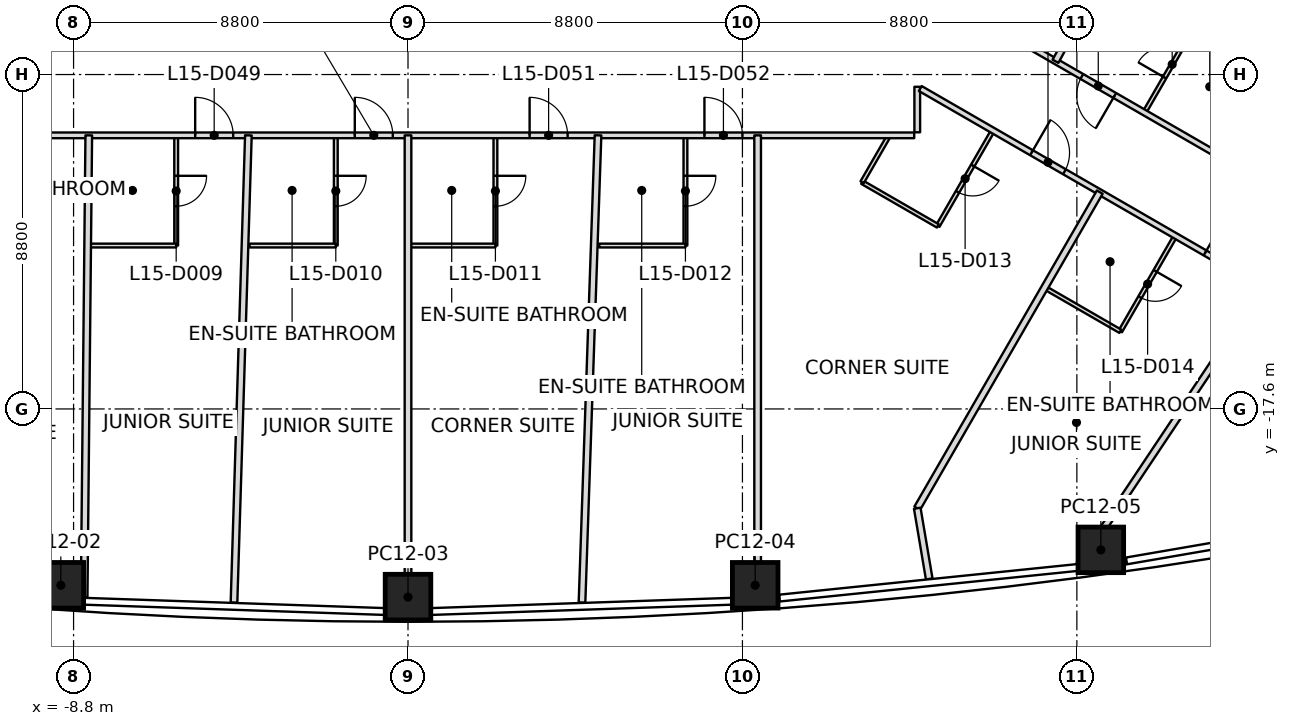
"""IFC4 building model, lengths in metres.
Left out: names, types, materials, properties, quantities, classifications, styles, units other than length and angle.
Written with IfcOpenShell. Run it as: python <this file> out.ifc"""

import sys

from ifc_helpers import new_model, si_unit, direction, frame, frame_2d, origin, origin_2d, place, context, subcontext, project, spatial, rectangle, extrude, clip, halfspace, element, fill, save


model = new_model("IFC4")
c1 = context("Model", 3, precision=1e-05, world=origin(), true_north=direction((0.0, 1.0)))
c2 = subcontext(c1, "Body", "Model", "MODEL_VIEW")
j1 = project(units=[si_unit("LENGTHUNIT", "METRE"), si_unit("PLANEANGLEUNIT", "RADIAN")], contexts=[c1])
p1 = place(None, origin())
s1 = spatial("IfcSite", under=j1, at=p1, CompositionType="ELEMENT")
p2 = place(p1, origin())
s2 = spatial("IfcBuilding", under=s1, at=p2, CompositionType="ELEMENT")
p3 = place(p2, frame((0.0, 0.0, 77.6)))
s3 = spatial("IfcBuildingStorey", under=s2, at=p3, CompositionType="ELEMENT", Elevation=77.6)
p4 = place(p3, frame((-9.135, -22.24, 0.0), z_axis=(0.009625518264, 0.040282134652, 0.999141981415), x_axis=(-0.997637584902, 0.068353896392, 0.006855219842)))
e1 = element("IfcColumn", 1, at=p4, inside=s3, PredefinedType="COLUMN", context=c2, shape_type="SweptSolid", body=[
    clip(clip(extrude(rectangle(XDim=1.2, YDim=1.2, at=origin_2d()), origin(), (0.0, 0.0, 1.0), 3.703), halfspace(frame((0.0, 0.0, 0.018)), True)), halfspace(frame((0.0, 0.0, 3.694)), False)),
])
p5 = place(p3, frame((0.0, -22.551, 0.0), z_axis=(0.0, 0.0427849366, 0.999084305352), x_axis=(1.0, 0.0, 0.0)))
e2 = element("IfcColumn", 2, at=p5, inside=s3, PredefinedType="COLUMN", context=c2, shape_type="SweptSolid", body=[
    clip(clip(extrude(rectangle(XDim=1.2, YDim=1.2, at=origin_2d()), origin(), (0.0, 0.0, 1.0), 3.703), halfspace(frame((0.0, 0.0, 0.019)), True)), halfspace(frame((0.0, 0.0, 3.694)), False)),
])
p6 = place(p3, frame((9.135, -22.24, 0.0), z_axis=(-0.009625518264, 0.040282134652, 0.999141981415), x_axis=(0.997637584902, 0.068353896392, 0.006855219842)))
e3 = element("IfcColumn", 3, at=p6, inside=s3, PredefinedType="COLUMN", context=c2, shape_type="SweptSolid", body=[
    clip(clip(extrude(rectangle(XDim=1.2, YDim=1.2, at=origin_2d()), origin(), (0.0, 0.0, 1.0), 3.703), halfspace(frame((0.0, 0.0, 0.018)), True)), halfspace(frame((0.0, 0.0, 3.694)), False)),
])
p7 = place(p3, frame((18.231, -21.308, 0.0), z_axis=(-0.019253687779, 0.03270489431, 0.999279583197), x_axis=(0.990559922783, 0.136298030063, 0.014624854803)))
e4 = element("IfcColumn", 4, at=p7, inside=s3, PredefinedType="COLUMN", context=c2, shape_type="SweptSolid", body=[
    clip(clip(extrude(rectangle(XDim=1.2, YDim=1.2, at=origin_2d()), origin(), (0.0, 0.0, 1.0), 3.703), halfspace(frame((0.0, 0.0, 0.015)), True)), halfspace(frame((0.0, 0.0, 3.695)), False)),
])
p8 = place(p3, frame((-8.4, -10.4, 0.0), z_axis=(0.0, 0.0, 1.0), x_axis=(-0.010057712495, -0.999949419931, 0.0)))
e5 = element("IfcWall", 5, at=p8, inside=s3, PredefinedType="PARTITIONING", context=c2, shape_type="SweptSolid", body=[
    extrude(rectangle(XDim=12.161, YDim=0.175, at=frame_2d((6.081, 0.0))), origin(), (0.0, 0.0, 1.0), 2.934),
])
p9 = place(p3, frame((-4.2, -10.4, 0.0), z_axis=(0.0, 0.0, 1.0), x_axis=(-0.030783045714, -0.999526089753, 0.0)))
e6 = element("IfcWall", 6, at=p9, inside=s3, PredefinedType="PARTITIONING", context=c2, shape_type="SweptSolid", body=[
    extrude(rectangle(XDim=12.301, YDim=0.175, at=frame_2d((6.15, 0.0))), origin(), (0.0, 0.0, 1.0), 2.934),
])
p10 = place(p3, frame((0.0, -10.4, 0.0), z_axis=(0.0, 0.0, 1.0), x_axis=(0.0, -1.0, 0.0)))
e7 = element("IfcWall", 7, at=p10, inside=s3, PredefinedType="PARTITIONING", context=c2, shape_type="SweptSolid", body=[
    extrude(rectangle(XDim=12.681, YDim=0.175, at=frame_2d((6.341, 0.0))), origin(), (0.0, 0.0, 1.0), 3.15),
])
p11 = place(p3, frame((5.0, -10.4, 0.0), z_axis=(0.0, 0.0, 1.0), x_axis=(-0.034252441484, -0.999413212967, 0.0)))
e8 = element("IfcWall", 8, at=p11, inside=s3, PredefinedType="PARTITIONING", context=c2, shape_type="SweptSolid", body=[
    extrude(rectangle(XDim=12.302, YDim=0.175, at=frame_2d((6.151, 0.0))), origin(), (0.0, 0.0, 1.0), 2.934),
])
p12 = place(p3, frame((9.2, -10.4, 0.0), z_axis=(0.0, 0.0, 1.0), x_axis=(0.0, -1.0, 0.0)))
e9 = element("IfcWall", 9, at=p12, inside=s3, PredefinedType="PARTITIONING", context=c2, shape_type="SweptSolid", body=[
    extrude(rectangle(XDim=12.364, YDim=0.175, at=frame_2d((6.182, 0.0))), origin(), (0.0, 0.0, 1.0), 3.15),
])
p13 = place(p3, frame((18.202, -11.895, 0.0), z_axis=(0.0, 0.0, 1.0), x_axis=(-0.500004836318, -0.866022611517, 0.0)))
e10 = element("IfcWall", 10, at=p13, inside=s3, PredefinedType="PARTITIONING", context=c2, shape_type="SweptSolid", body=[
    extrude(rectangle(XDim=9.604, YDim=0.175, at=frame_2d((4.802, 0.0))), origin(), (0.0, 0.0, 1.0), 3.093),
])
p14 = place(p3, frame((13.4, -20.212, 0.0), z_axis=(0.0, 0.0, 1.0), x_axis=(0.166811851032, -0.985988745552, 0.0)))
e11 = element("IfcWall", 11, at=p14, inside=s3, PredefinedType="PARTITIONING", context=c2, shape_type="SweptSolid", body=[
    extrude(rectangle(XDim=1.886, YDim=0.175, at=frame_2d((0.943, 0.0))), origin(), (0.0, 0.0, 1.0), 2.934),
])
p15 = place(p3, frame((23.741, 3.817, 0.0), z_axis=(0.0, 0.0, 1.0), x_axis=(-0.479523714328, -0.877528921117, 0.0)))
e12 = element("IfcWall", 12, at=p15, inside=s3, PredefinedType="PARTITIONING", context=c2, shape_type="SweptSolid", body=[
    extrude(rectangle(XDim=13.98, YDim=0.175, at=frame_2d((6.99, 0.0))), origin(), (0.0, 0.0, 1.0), 2.947),
])
p16 = place(p3, frame((22.532, -14.395, 0.0), z_axis=(0.0, 0.0, 1.0), x_axis=(-0.554931610564, -0.83189597162, 0.0)))
e13 = element("IfcWall", 13, at=p16, inside=s3, PredefinedType="PARTITIONING", context=c2, shape_type="SweptSolid", body=[
    extrude(rectangle(XDim=8.764, YDim=0.175, at=frame_2d((4.382, 0.0))), origin(), (0.0, 0.0, 1.0), 3.15),
])
p17 = place(p3, frame((-13.32, -10.4, 0.0), z_axis=(0.0, 0.0, 1.0), x_axis=(1.0, 0.0, 0.0)))
e14 = element("IfcWall", 14, at=p17, inside=s3, PredefinedType="PARTITIONING", context=c2, shape_type="SweptSolid", body=[
    extrude(rectangle(XDim=26.64, YDim=0.15, at=frame_2d((13.32, 0.0))), origin(), (0.0, 0.0, 1.0), 2.947),
])
p18 = place(p17, frame((7.72, 0.0, 0.0)))
e15 = element("IfcOpeningElement", 15, at=p18, cuts=e14, PredefinedType="OPENING", context=c2, shape_type="SweptSolid", body=[
    extrude(rectangle(XDim=1.0, YDim=2.1, at=frame_2d((0.5, 1.05))), frame((0.0, 0.075, 0.0), z_axis=(0.0, -1.0, 0.0), x_axis=(1.0, 0.0, 0.0)), (0.0, 0.0, 1.0), 0.15),
])
p19 = place(p17, frame((11.92, 0.0, 0.0)))
e16 = element("IfcOpeningElement", 16, at=p19, cuts=e14, PredefinedType="OPENING", context=c2, shape_type="SweptSolid", body=[
    extrude(rectangle(XDim=1.0, YDim=2.1, at=frame_2d((0.5, 1.05))), frame((0.0, 0.075, 0.0), z_axis=(0.0, -1.0, 0.0), x_axis=(1.0, 0.0, 0.0)), (0.0, 0.0, 1.0), 0.15),
])
p20 = place(p17, frame((16.52, 0.0, 0.0)))
e17 = element("IfcOpeningElement", 17, at=p20, cuts=e14, PredefinedType="OPENING", context=c2, shape_type="SweptSolid", body=[
    extrude(rectangle(XDim=1.0, YDim=2.1, at=frame_2d((0.5, 1.05))), frame((0.0, 0.075, 0.0), z_axis=(0.0, -1.0, 0.0), x_axis=(1.0, 0.0, 0.0)), (0.0, 0.0, 1.0), 0.15),
])
p21 = place(p17, frame((21.12, 0.0, 0.0)))
e18 = element("IfcOpeningElement", 18, at=p21, cuts=e14, PredefinedType="OPENING", context=c2, shape_type="SweptSolid", body=[
    extrude(rectangle(XDim=1.0, YDim=2.1, at=frame_2d((0.5, 1.05))), frame((0.0, 0.075, 0.0), z_axis=(0.0, -1.0, 0.0), x_axis=(1.0, 0.0, 0.0)), (0.0, 0.0, 1.0), 0.15),
])
p22 = place(p3, frame((13.4, -10.32, 0.0), z_axis=(0.0, 0.0, 1.0), x_axis=(0.0, 1.0, 0.0)))
e19 = element("IfcWall", 19, at=p22, inside=s3, PredefinedType="PARTITIONING", context=c2, shape_type="SweptSolid", body=[
    extrude(rectangle(XDim=1.198, YDim=0.15, at=frame_2d((0.599, 0.0))), origin(), (0.0, 0.0, 1.0), 2.797),
])
p23 = place(p3, frame((13.479, -9.168, 0.0), z_axis=(0.0, 0.0, 1.0), x_axis=(0.866028819782, -0.499994083273, 0.0)))
e20 = element("IfcWall", 20, at=p23, inside=s3, PredefinedType="PARTITIONING", context=c2, shape_type="SweptSolid", body=[
    extrude(rectangle(XDim=10.374, YDim=0.15, at=frame_2d((5.187, 0.0))), origin(), (0.0, 0.0, 1.0), 2.797),
])
p24 = place(p23, frame((3.381, 0.0, 0.0)))
e21 = element("IfcOpeningElement", 21, at=p24, cuts=e20, PredefinedType="OPENING", context=c2, shape_type="SweptSolid", body=[
    extrude(rectangle(XDim=1.0, YDim=2.1, at=frame_2d((0.5, 1.05))), frame((0.0, 0.075, 0.0), z_axis=(0.0, -1.0, 0.0), x_axis=(1.0, 0.0, 0.0)), (0.0, 0.0, 1.0), 0.15),
])
p25 = place(p23, frame((8.654, 0.0, 0.0)))
e22 = element("IfcOpeningElement", 22, at=p25, cuts=e20, PredefinedType="OPENING", context=c2, shape_type="SweptSolid", body=[
    extrude(rectangle(XDim=1.0, YDim=2.1, at=frame_2d((0.5, 1.05))), frame((0.0, 0.075, 0.0), z_axis=(0.0, -1.0, 0.0), x_axis=(1.0, 0.0, 0.0)), (0.0, 0.0, 1.0), 0.15),
])
p26 = place(p3, frame((23.663, -12.276, 0.0), z_axis=(0.0, 0.0, 1.0), x_axis=(-0.866031207587, 0.499989947384, 0.0)))
e23 = element("IfcWall", 23, at=p26, inside=s3, PredefinedType="PARTITIONING", context=c2, shape_type="SweptSolid", body=[
    extrude(rectangle(XDim=11.851, YDim=0.15, at=frame_2d((5.925, 0.0))), origin(), (0.0, 0.0, 1.0), 2.947),
])
p27 = place(p26, frame((0.785, 0.0, 0.0)))
e24 = element("IfcOpeningElement", 24, at=p27, cuts=e23, PredefinedType="OPENING", context=c2, shape_type="SweptSolid", body=[
    extrude(rectangle(XDim=1.0, YDim=2.1, at=frame_2d((0.5, 1.05))), frame((0.0, 0.075, 0.0), z_axis=(0.0, -1.0, 0.0), x_axis=(1.0, 0.0, 0.0)), (0.0, 0.0, 1.0), 0.15),
])
p28 = place(p26, frame((5.851, 0.0, 0.0)))
e25 = element("IfcOpeningElement", 25, at=p28, cuts=e23, PredefinedType="OPENING", context=c2, shape_type="SweptSolid", body=[
    extrude(rectangle(XDim=1.0, YDim=2.1, at=frame_2d((0.5, 1.05))), frame((0.0, 0.075, 0.0), z_axis=(0.0, -1.0, 0.0), x_axis=(1.0, 0.0, 0.0)), (0.0, 0.0, 1.0), 0.15),
])
p29 = place(p3, frame((-6.1, -10.43, 0.0), z_axis=(0.0, 0.0, 1.0), x_axis=(0.0, -1.0, 0.0)))
e26 = element("IfcWall", 26, at=p29, inside=s3, PredefinedType="PARTITIONING", context=c2, shape_type="SweptSolid", body=[
    extrude(rectangle(XDim=2.87, YDim=0.1, at=frame_2d((1.435, 0.0))), origin(), (0.0, 0.0, 1.0), 3.15),
])
p30 = place(p29, frame((1.035, 0.0, 0.0)))
e27 = element("IfcOpeningElement", 27, at=p30, cuts=e26, PredefinedType="OPENING", context=c2, shape_type="SweptSolid", body=[
    extrude(rectangle(XDim=0.8, YDim=2.1, at=frame_2d((0.4, 1.05))), frame((0.0, 0.05, 0.0), z_axis=(0.0, -1.0, 0.0), x_axis=(1.0, 0.0, 0.0)), (0.0, 0.0, 1.0), 0.1),
])
p31 = place(p3, frame((-6.1, -13.3, 0.0), z_axis=(0.0, 0.0, 1.0), x_axis=(-1.0, 0.0, 0.0)))
e28 = element("IfcWall", 28, at=p31, inside=s3, PredefinedType="PARTITIONING", context=c2, shape_type="SweptSolid", body=[
    extrude(rectangle(XDim=2.27, YDim=0.1, at=frame_2d((1.135, 0.0))), origin(), (0.0, 0.0, 1.0), 3.15),
])
p32 = place(p3, frame((-1.9, -10.43, 0.0), z_axis=(0.0, 0.0, 1.0), x_axis=(0.0, -1.0, 0.0)))
e29 = element("IfcWall", 29, at=p32, inside=s3, PredefinedType="PARTITIONING", context=c2, shape_type="SweptSolid", body=[
    extrude(rectangle(XDim=2.87, YDim=0.1, at=frame_2d((1.435, 0.0))), origin(), (0.0, 0.0, 1.0), 3.15),
])
p33 = place(p32, frame((1.035, 0.0, 0.0)))
e30 = element("IfcOpeningElement", 30, at=p33, cuts=e29, PredefinedType="OPENING", context=c2, shape_type="SweptSolid", body=[
    extrude(rectangle(XDim=0.8, YDim=2.1, at=frame_2d((0.4, 1.05))), frame((0.0, 0.05, 0.0), z_axis=(0.0, -1.0, 0.0), x_axis=(1.0, 0.0, 0.0)), (0.0, 0.0, 1.0), 0.1),
])
p34 = place(p3, frame((-1.9, -13.3, 0.0), z_axis=(0.0, 0.0, 1.0), x_axis=(-1.0, 0.0, 0.0)))
e31 = element("IfcWall", 31, at=p34, inside=s3, PredefinedType="PARTITIONING", context=c2, shape_type="SweptSolid", body=[
    extrude(rectangle(XDim=2.27, YDim=0.1, at=frame_2d((1.135, 0.0))), origin(), (0.0, 0.0, 1.0), 3.15),
])
p35 = place(p3, frame((2.3, -10.43, 0.0), z_axis=(0.0, 0.0, 1.0), x_axis=(0.0, -1.0, 0.0)))
e32 = element("IfcWall", 32, at=p35, inside=s3, PredefinedType="PARTITIONING", context=c2, shape_type="SweptSolid", body=[
    extrude(rectangle(XDim=2.87, YDim=0.1, at=frame_2d((1.435, 0.0))), origin(), (0.0, 0.0, 1.0), 3.15),
])
p36 = place(p35, frame((1.035, 0.0, 0.0)))
e33 = element("IfcOpeningElement", 33, at=p36, cuts=e32, PredefinedType="OPENING", context=c2, shape_type="SweptSolid", body=[
    extrude(rectangle(XDim=0.8, YDim=2.1, at=frame_2d((0.4, 1.05))), frame((0.0, 0.05, 0.0), z_axis=(0.0, -1.0, 0.0), x_axis=(1.0, 0.0, 0.0)), (0.0, 0.0, 1.0), 0.1),
])
p37 = place(p3, frame((2.3, -13.3, 0.0), z_axis=(0.0, 0.0, 1.0), x_axis=(-1.0, 0.0, 0.0)))
e34 = element("IfcWall", 34, at=p37, inside=s3, PredefinedType="PARTITIONING", context=c2, shape_type="SweptSolid", body=[
    extrude(rectangle(XDim=2.27, YDim=0.1, at=frame_2d((1.135, 0.0))), origin(), (0.0, 0.0, 1.0), 2.947),
])
p38 = place(p3, frame((7.3, -10.43, 0.0), z_axis=(0.0, 0.0, 1.0), x_axis=(0.0, -1.0, 0.0)))
e35 = element("IfcWall", 35, at=p38, inside=s3, PredefinedType="PARTITIONING", context=c2, shape_type="SweptSolid", body=[
    extrude(rectangle(XDim=2.87, YDim=0.1, at=frame_2d((1.435, 0.0))), origin(), (0.0, 0.0, 1.0), 3.15),
])
p39 = place(p38, frame((1.035, 0.0, 0.0)))
e36 = element("IfcOpeningElement", 36, at=p39, cuts=e35, PredefinedType="OPENING", context=c2, shape_type="SweptSolid", body=[
    extrude(rectangle(XDim=0.8, YDim=2.1, at=frame_2d((0.4, 1.05))), frame((0.0, 0.05, 0.0), z_axis=(0.0, -1.0, 0.0), x_axis=(1.0, 0.0, 0.0)), (0.0, 0.0, 1.0), 0.1),
])
p40 = place(p3, frame((7.3, -13.3, 0.0), z_axis=(0.0, 0.0, 1.0), x_axis=(-1.0, 0.0, 0.0)))
e37 = element("IfcWall", 37, at=p40, inside=s3, PredefinedType="PARTITIONING", context=c2, shape_type="SweptSolid", body=[
    extrude(rectangle(XDim=2.27, YDim=0.1, at=frame_2d((1.135, 0.0))), origin(), (0.0, 0.0, 1.0), 3.15),
])
p41 = place(p3, frame((15.377, -10.298, 0.0), z_axis=(0.0, 0.0, 1.0), x_axis=(-0.499999802827, -0.866025517622, 0.0)))
e38 = element("IfcWall", 38, at=p41, inside=s3, PredefinedType="PARTITIONING", context=c2, shape_type="SweptSolid", body=[
    extrude(rectangle(XDim=2.87, YDim=0.1, at=frame_2d((1.435, 0.0))), origin(), (0.0, 0.0, 1.0), 2.797),
])
p42 = place(p41, frame((1.035, 0.0, 0.0)))
e39 = element("IfcOpeningElement", 39, at=p42, cuts=e38, PredefinedType="OPENING", context=c2, shape_type="SweptSolid", body=[
    extrude(rectangle(XDim=0.8, YDim=2.1, at=frame_2d((0.4, 1.05))), frame((0.0, 0.05, 0.0), z_axis=(0.0, -1.0, 0.0), x_axis=(1.0, 0.0, 0.0)), (0.0, 0.0, 1.0), 0.1),
])
p43 = place(p3, frame((13.942, -12.784, 0.0), z_axis=(0.0, 0.0, 1.0), x_axis=(-0.866007057882, 0.500031774688, 0.0)))
e40 = element("IfcWall", 40, at=p43, inside=s3, PredefinedType="PARTITIONING", context=c2, shape_type="SweptSolid", body=[
    extrude(rectangle(XDim=2.3, YDim=0.1, at=frame_2d((1.15, 0.0))), origin(), (0.0, 0.0, 1.0), 3.15),
])
p44 = place(p3, frame((11.95, -11.634, 0.0), z_axis=(0.0, 0.0, 1.0), x_axis=(0.500087364259, 0.86597495813, 0.0)))
e41 = element("IfcWall", 41, at=p44, inside=s3, PredefinedType="PARTITIONING", context=c2, shape_type="SweptSolid", body=[
    extrude(rectangle(XDim=1.39, YDim=0.1, at=frame_2d((0.695, 0.0))), origin(), (0.0, 0.0, 1.0), 3.15),
])
p45 = place(p3, frame((20.179, -13.071, 0.0), z_axis=(0.0, 0.0, 1.0), x_axis=(-0.500036638401, -0.866004249561, 0.0)))
e42 = element("IfcWall", 42, at=p45, inside=s3, PredefinedType="PARTITIONING", context=c2, shape_type="SweptSolid", body=[
    extrude(rectangle(XDim=2.87, YDim=0.1, at=frame_2d((1.435, 0.0))), origin(), (0.0, 0.0, 1.0), 3.15),
])
p46 = place(p45, frame((1.035, 0.0, 0.0)))
e43 = element("IfcOpeningElement", 43, at=p46, cuts=e42, PredefinedType="OPENING", context=c2, shape_type="SweptSolid", body=[
    extrude(rectangle(XDim=0.8, YDim=2.1, at=frame_2d((0.4, 1.05))), frame((0.0, 0.05, 0.0), z_axis=(0.0, -1.0, 0.0), x_axis=(1.0, 0.0, 0.0)), (0.0, 0.0, 1.0), 0.1),
])
p47 = place(p3, frame((18.744, -15.556, 0.0), z_axis=(0.0, 0.0, 1.0), x_axis=(-0.866017224141, 0.500014167291, 0.0)))
e44 = element("IfcWall", 44, at=p47, inside=s3, PredefinedType="PARTITIONING", context=c2, shape_type="SweptSolid", body=[
    extrude(rectangle(XDim=2.27, YDim=0.1, at=frame_2d((1.135, 0.0))), origin(), (0.0, 0.0, 1.0), 3.15),
])
p48 = place(p3, frame((19.391, -9.775, 0.0), z_axis=(0.0, 0.0, 1.0), x_axis=(0.499999802827, 0.866025517622, 0.0)))
e45 = element("IfcWall", 45, at=p48, inside=s3, PredefinedType="PARTITIONING", context=c2, shape_type="SweptSolid", body=[
    extrude(rectangle(XDim=2.87, YDim=0.1, at=frame_2d((1.435, 0.0))), origin(), (0.0, 0.0, 1.0), 3.15),
])
p49 = place(p48, frame((1.035, 0.0, 0.0)))
e46 = element("IfcOpeningElement", 46, at=p49, cuts=e45, PredefinedType="OPENING", context=c2, shape_type="SweptSolid", body=[
    extrude(rectangle(XDim=0.8, YDim=2.1, at=frame_2d((0.4, 1.05))), frame((0.0, 0.05, 0.0), z_axis=(0.0, -1.0, 0.0), x_axis=(1.0, 0.0, 0.0)), (0.0, 0.0, 1.0), 0.1),
])
p50 = place(p3, frame((20.826, -7.289, 0.0), z_axis=(0.0, 0.0, 1.0), x_axis=(0.866017224141, -0.500014167291, 0.0)))
e47 = element("IfcWall", 47, at=p50, inside=s3, PredefinedType="PARTITIONING", context=c2, shape_type="SweptSolid", body=[
    extrude(rectangle(XDim=2.27, YDim=0.1, at=frame_2d((1.135, 0.0))), origin(), (0.0, 0.0, 1.0), 3.15),
])
p51 = place(p18, origin())
e48 = element("IfcDoor", 48, at=p51, inside=s3, OperationType="SINGLE_SWING_LEFT", PredefinedType="DOOR", context=c2, shape_type="SweptSolid", body=[
    extrude(rectangle(XDim=1.0, YDim=2.1, at=frame_2d((0.5, 1.05))), frame((0.0, 0.025, 0.0), z_axis=(0.0, -1.0, 0.0), x_axis=(1.0, 0.0, 0.0)), (0.0, 0.0, 1.0), 0.05),
])
fill(e15, e48)
p52 = place(p30, origin())
e49 = element("IfcDoor", 49, at=p52, inside=s3, OperationType="SINGLE_SWING_RIGHT", PredefinedType="DOOR", context=c2, shape_type="SweptSolid", body=[
    extrude(rectangle(XDim=0.8, YDim=2.1, at=frame_2d((0.4, 1.05))), frame((0.0, 0.025, 0.0), z_axis=(0.0, -1.0, 0.0), x_axis=(1.0, 0.0, 0.0)), (0.0, 0.0, 1.0), 0.05),
])
fill(e27, e49)
p53 = place(p19, origin())
e50 = element("IfcDoor", 50, at=p53, inside=s3, OperationType="SINGLE_SWING_LEFT", PredefinedType="DOOR", context=c2, shape_type="SweptSolid", body=[
    extrude(rectangle(XDim=1.0, YDim=2.1, at=frame_2d((0.5, 1.05))), frame((0.0, 0.025, 0.0), z_axis=(0.0, -1.0, 0.0), x_axis=(1.0, 0.0, 0.0)), (0.0, 0.0, 1.0), 0.05),
])
fill(e16, e50)
p54 = place(p33, origin())
e51 = element("IfcDoor", 51, at=p54, inside=s3, OperationType="SINGLE_SWING_LEFT", PredefinedType="DOOR", context=c2, shape_type="SweptSolid", body=[
    extrude(rectangle(XDim=0.8, YDim=2.1, at=frame_2d((0.4, 1.05))), frame((0.0, 0.025, 0.0), z_axis=(0.0, -1.0, 0.0), x_axis=(1.0, 0.0, 0.0)), (0.0, 0.0, 1.0), 0.05),
])
fill(e30, e51)
p55 = place(p20, origin())
e52 = element("IfcDoor", 52, at=p55, inside=s3, OperationType="SINGLE_SWING_LEFT", PredefinedType="DOOR", context=c2, shape_type="SweptSolid", body=[
    extrude(rectangle(XDim=1.0, YDim=2.1, at=frame_2d((0.5, 1.05))), frame((0.0, 0.025, 0.0), z_axis=(0.0, -1.0, 0.0), x_axis=(1.0, 0.0, 0.0)), (0.0, 0.0, 1.0), 0.05),
])
fill(e17, e52)
p56 = place(p36, origin())
e53 = element("IfcDoor", 53, at=p56, inside=s3, OperationType="SINGLE_SWING_RIGHT", PredefinedType="DOOR", context=c2, shape_type="SweptSolid", body=[
    extrude(rectangle(XDim=0.8, YDim=2.1, at=frame_2d((0.4, 1.05))), frame((0.0, 0.025, 0.0), z_axis=(0.0, -1.0, 0.0), x_axis=(1.0, 0.0, 0.0)), (0.0, 0.0, 1.0), 0.05),
])
fill(e33, e53)
p57 = place(p21, origin())
e54 = element("IfcDoor", 54, at=p57, inside=s3, OperationType="SINGLE_SWING_LEFT", PredefinedType="DOOR", context=c2, shape_type="SweptSolid", body=[
    extrude(rectangle(XDim=1.0, YDim=2.1, at=frame_2d((0.5, 1.05))), frame((0.0, 0.025, 0.0), z_axis=(0.0, -1.0, 0.0), x_axis=(1.0, 0.0, 0.0)), (0.0, 0.0, 1.0), 0.05),
])
fill(e18, e54)
p58 = place(p39, origin())
e55 = element("IfcDoor", 55, at=p58, inside=s3, OperationType="SINGLE_SWING_RIGHT", PredefinedType="DOOR", context=c2, shape_type="SweptSolid", body=[
    extrude(rectangle(XDim=0.8, YDim=2.1, at=frame_2d((0.4, 1.05))), frame((0.0, 0.025, 0.0), z_axis=(0.0, -1.0, 0.0), x_axis=(1.0, 0.0, 0.0)), (0.0, 0.0, 1.0), 0.05),
])
fill(e36, e55)
p59 = place(p24, origin())
e56 = element("IfcDoor", 56, at=p59, inside=s3, OperationType="SINGLE_SWING_LEFT", PredefinedType="DOOR", context=c2, shape_type="SweptSolid", body=[
    extrude(rectangle(XDim=1.0, YDim=2.1, at=frame_2d((0.5, 1.05))), frame((0.0, 0.025, 0.0), z_axis=(0.0, -1.0, 0.0), x_axis=(1.0, 0.0, 0.0)), (0.0, 0.0, 1.0), 0.05),
])
fill(e21, e56)
p60 = place(p42, origin())
e57 = element("IfcDoor", 57, at=p60, inside=s3, OperationType="SINGLE_SWING_RIGHT", PredefinedType="DOOR", context=c2, shape_type="SweptSolid", body=[
    extrude(rectangle(XDim=0.8, YDim=2.1, at=frame_2d((0.4, 1.05))), frame((0.0, 0.025, 0.0), z_axis=(0.0, -1.0, 0.0), x_axis=(1.0, 0.0, 0.0)), (0.0, 0.0, 1.0), 0.05),
])
fill(e39, e57)
p61 = place(p25, origin())
e58 = element("IfcDoor", 58, at=p61, inside=s3, OperationType="SINGLE_SWING_LEFT", PredefinedType="DOOR", context=c2, shape_type="SweptSolid", body=[
    extrude(rectangle(XDim=1.0, YDim=2.1, at=frame_2d((0.5, 1.05))), frame((0.0, 0.025, 0.0), z_axis=(0.0, -1.0, 0.0), x_axis=(1.0, 0.0, 0.0)), (0.0, 0.0, 1.0), 0.05),
])
fill(e22, e58)
p62 = place(p46, origin())
e59 = element("IfcDoor", 59, at=p62, inside=s3, OperationType="SINGLE_SWING_RIGHT", PredefinedType="DOOR", context=c2, shape_type="SweptSolid", body=[
    extrude(rectangle(XDim=0.8, YDim=2.1, at=frame_2d((0.4, 1.05))), frame((0.0, 0.025, 0.0), z_axis=(0.0, -1.0, 0.0), x_axis=(1.0, 0.0, 0.0)), (0.0, 0.0, 1.0), 0.05),
])
fill(e43, e59)
p63 = place(p28, origin())
e60 = element("IfcDoor", 60, at=p63, inside=s3, OperationType="SINGLE_SWING_LEFT", PredefinedType="DOOR", context=c2, shape_type="SweptSolid", body=[
    extrude(rectangle(XDim=1.0, YDim=2.1, at=frame_2d((0.5, 1.05))), frame((0.0, 0.025, 0.0), z_axis=(0.0, -1.0, 0.0), x_axis=(1.0, 0.0, 0.0)), (0.0, 0.0, 1.0), 0.05),
])
fill(e25, e60)
p64 = place(p49, origin())
e61 = element("IfcDoor", 61, at=p64, inside=s3, OperationType="SINGLE_SWING_LEFT", PredefinedType="DOOR", context=c2, shape_type="SweptSolid", body=[
    extrude(rectangle(XDim=0.8, YDim=2.1, at=frame_2d((0.4, 1.05))), frame((0.0, 0.025, 0.0), z_axis=(0.0, -1.0, 0.0), x_axis=(1.0, 0.0, 0.0)), (0.0, 0.0, 1.0), 0.05),
])
fill(e46, e61)
save(model, sys.argv[1])
